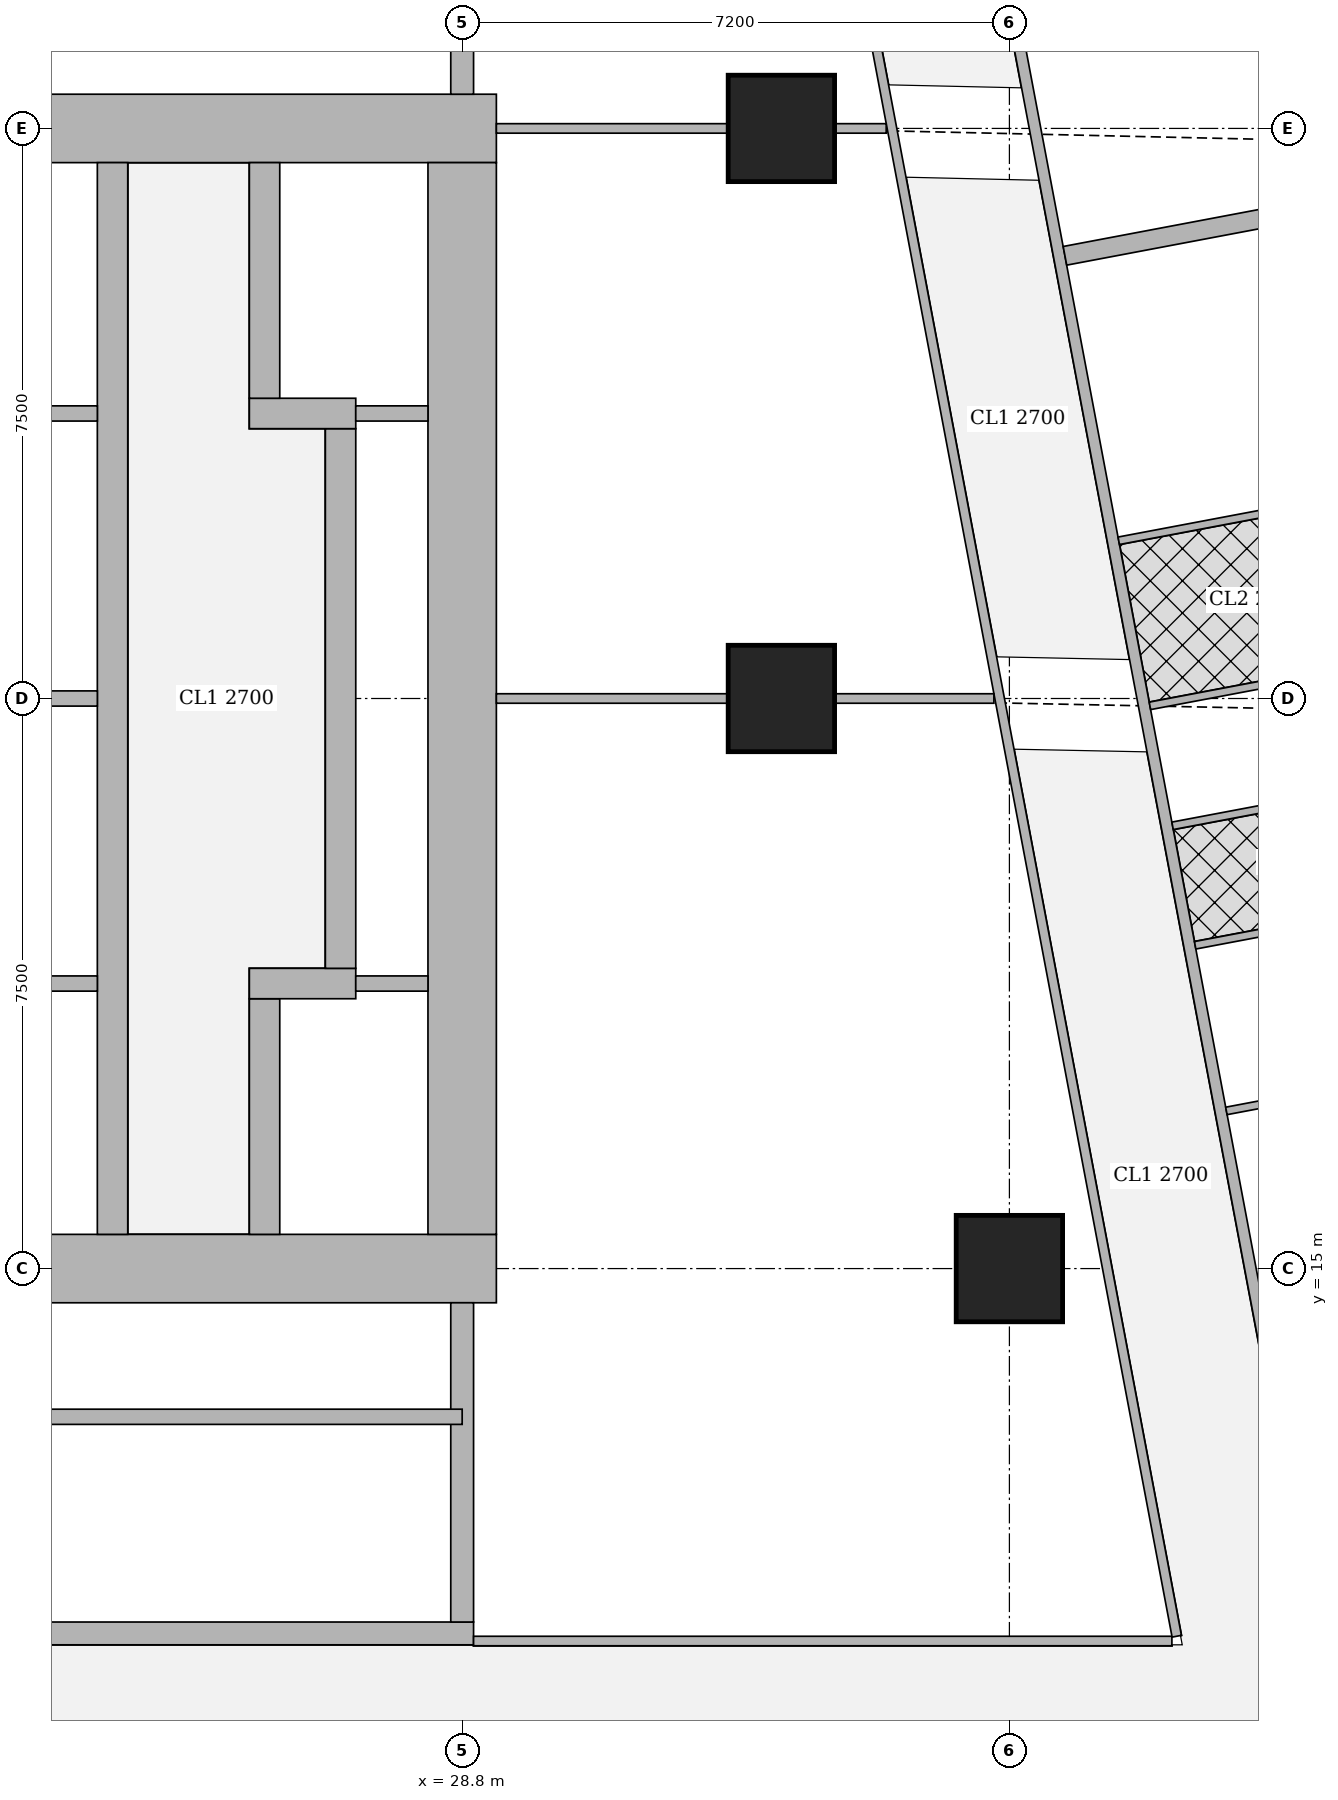
"""IFC4 building model, lengths in metres.
Left out: names, types, materials, properties, quantities, classifications, styles, units other than length and angle.
Written with IfcOpenShell. Run it as: python <this file> out.ifc"""

import sys

from ifc_helpers import new_model, si_unit, direction, frame, frame_2d, origin, origin_2d, place, context, subcontext, project, spatial, rectangle, extrude, element, fill, save


model = new_model("IFC4")
c1 = context("Model", 3, precision=1e-05, world=origin(), true_north=direction((0.0, 1.0)))
c2 = subcontext(c1, "Body", "Model", "MODEL_VIEW")
j1 = project(units=[si_unit("LENGTHUNIT", "METRE"), si_unit("PLANEANGLEUNIT", "RADIAN")], contexts=[c1])
p1 = place(None, origin())
s1 = spatial("IfcSite", under=j1, at=p1, CompositionType="ELEMENT")
p2 = place(p1, origin())
s2 = spatial("IfcBuilding", under=s1, at=p2, CompositionType="ELEMENT")
p3 = place(p2, frame((0.0, 0.0, 234.95)))
s3 = spatial("IfcBuildingStorey", under=s2, at=p3, CompositionType="ELEMENT", Elevation=234.95)
for number, where, z_axis, x_axis in (
    (1, (36.0, 15.0, 0.0), (0.0, 0.0, 1.0), (1.0, 0.0, 0.0)),
    (2, (33.0, 22.5, 0.0), (0.0, 0.0, 1.0), (1.0, 0.0, 0.0)),
    (3, (33.0, 30.0, 0.0), (0.0, 0.0, 1.0), (1.0, 0.0, 0.0)),
):
    element("IfcColumn", number, at=place(p3, frame(where, z_axis=z_axis, x_axis=x_axis)), inside=s3, PredefinedType="COLUMN", context=c2, shape_type="SweptSolid", body=[
        extrude(rectangle(XDim=1.4, YDim=1.4, at=origin_2d()), origin(), (0.0, 0.0, 1.0), 3.75),
    ])
p4 = place(p3, frame((13.95, 15.0, 0.0), z_axis=(0.0, 0.0, 1.0), x_axis=(1.0, 0.0, 0.0)))
e4 = element("IfcWall", 4, at=p4, inside=s3, PredefinedType="SHEAR", context=c2, shape_type="SweptSolid", body=[
    extrude(rectangle(XDim=15.3, YDim=0.9, at=frame_2d((7.65, 0.0))), origin(), (0.0, 0.0, 1.0), 3.75),
])
p5 = place(p4, frame((4.45, 0.0, 0.0)))
e5 = element("IfcOpeningElement", 5, at=p5, cuts=e4, PredefinedType="OPENING", context=c2, shape_type="SweptSolid", body=[
    extrude(rectangle(XDim=1.8, YDim=2.1, at=frame_2d((0.9, 1.05))), frame((0.0, 0.46, 0.0), z_axis=(0.0, -1.0, 0.0), x_axis=(1.0, 0.0, 0.0)), (0.0, 0.0, 1.0), 0.92),
])
p6 = place(p4, frame((10.7, 0.0, 0.0)))
e6 = element("IfcOpeningElement", 6, at=p6, cuts=e4, PredefinedType="OPENING", context=c2, shape_type="SweptSolid", body=[
    extrude(rectangle(XDim=1.1, YDim=2.1, at=frame_2d((0.55, 1.05))), frame((0.0, 0.46, 0.0), z_axis=(0.0, -1.0, 0.0), x_axis=(1.0, 0.0, 0.0)), (0.0, 0.0, 1.0), 0.92),
])
p7 = place(p3, frame((13.95, 30.0, 0.0), z_axis=(0.0, 0.0, 1.0), x_axis=(1.0, 0.0, 0.0)))
e7 = element("IfcWall", 7, at=p7, inside=s3, PredefinedType="SHEAR", context=c2, shape_type="SweptSolid", body=[
    extrude(rectangle(XDim=15.3, YDim=0.9, at=frame_2d((7.65, 0.0))), origin(), (0.0, 0.0, 1.0), 3.75),
])
p8 = place(p7, frame((4.45, 0.0, 0.0)))
e8 = element("IfcOpeningElement", 8, at=p8, cuts=e7, PredefinedType="OPENING", context=c2, shape_type="SweptSolid", body=[
    extrude(rectangle(XDim=1.8, YDim=2.1, at=frame_2d((0.9, 1.05))), frame((0.0, 0.46, 0.0), z_axis=(0.0, -1.0, 0.0), x_axis=(1.0, 0.0, 0.0)), (0.0, 0.0, 1.0), 0.92),
])
p9 = place(p7, frame((10.7, 0.0, 0.0)))
e9 = element("IfcOpeningElement", 9, at=p9, cuts=e7, PredefinedType="OPENING", context=c2, shape_type="SweptSolid", body=[
    extrude(rectangle(XDim=1.1, YDim=2.1, at=frame_2d((0.55, 1.05))), frame((0.0, 0.46, 0.0), z_axis=(0.0, -1.0, 0.0), x_axis=(1.0, 0.0, 0.0)), (0.0, 0.0, 1.0), 0.92),
])
p10 = place(p3, frame((28.8, 15.45, 0.0), z_axis=(0.0, 0.0, 1.0), x_axis=(0.0, 1.0, 0.0)))
e10 = element("IfcWall", 10, at=p10, inside=s3, PredefinedType="SHEAR", context=c2, shape_type="SweptSolid", body=[
    extrude(rectangle(XDim=14.1, YDim=0.9, at=frame_2d((7.05, 0.0))), origin(), (0.0, 0.0, 1.0), 3.75),
])
p11 = place(p3, frame((24.2, 15.45, 0.0), z_axis=(0.0, 0.0, 1.0), x_axis=(0.0, 1.0, 0.0)))
e11 = element("IfcWall", 11, at=p11, inside=s3, PredefinedType="SHEAR", context=c2, shape_type="SweptSolid", body=[
    extrude(rectangle(XDim=14.1, YDim=0.4, at=frame_2d((7.05, 0.0))), origin(), (0.0, 0.0, 1.0), 3.75),
])
p12 = place(p3, frame((26.2, 15.45, 0.0), z_axis=(0.0, 0.0, 1.0), x_axis=(0.0, 1.0, 0.0)))
e12 = element("IfcWall", 12, at=p12, inside=s3, PredefinedType="SHEAR", context=c2, shape_type="SweptSolid", body=[
    extrude(rectangle(XDim=3.1, YDim=0.4, at=frame_2d((1.55, 0.0))), origin(), (0.0, 0.0, 1.0), 3.75),
])
p13 = place(p12, frame((0.825, 0.0, 0.0)))
e13 = element("IfcOpeningElement", 13, at=p13, cuts=e12, PredefinedType="OPENING", context=c2, shape_type="SweptSolid", body=[
    extrude(rectangle(XDim=1.2, YDim=2.1, at=frame_2d((0.6, 1.05))), frame((0.0, 0.21, 0.0), z_axis=(0.0, -1.0, 0.0), x_axis=(1.0, 0.0, 0.0)), (0.0, 0.0, 1.0), 0.42),
])
p14 = place(p3, frame((26.0, 18.75, 0.0), z_axis=(0.0, 0.0, 1.0), x_axis=(1.0, 0.0, 0.0)))
e14 = element("IfcWall", 14, at=p14, inside=s3, PredefinedType="SHEAR", context=c2, shape_type="SweptSolid", body=[
    extrude(rectangle(XDim=1.4, YDim=0.4, at=frame_2d((0.7, 0.0))), origin(), (0.0, 0.0, 1.0), 3.75),
])
p15 = place(p3, frame((27.2, 18.95, 0.0), z_axis=(0.0, 0.0, 1.0), x_axis=(0.0, 1.0, 0.0)))
e15 = element("IfcWall", 15, at=p15, inside=s3, PredefinedType="SHEAR", context=c2, shape_type="SweptSolid", body=[
    extrude(rectangle(XDim=7.1, YDim=0.4, at=frame_2d((3.55, 0.0))), origin(), (0.0, 0.0, 1.0), 3.75),
])
p16 = place(p3, frame((26.0, 26.25, 0.0), z_axis=(0.0, 0.0, 1.0), x_axis=(1.0, 0.0, 0.0)))
e16 = element("IfcWall", 16, at=p16, inside=s3, PredefinedType="SHEAR", context=c2, shape_type="SweptSolid", body=[
    extrude(rectangle(XDim=1.4, YDim=0.4, at=frame_2d((0.7, 0.0))), origin(), (0.0, 0.0, 1.0), 3.75),
])
p17 = place(p3, frame((26.2, 26.45, 0.0), z_axis=(0.0, 0.0, 1.0), x_axis=(0.0, 1.0, 0.0)))
e17 = element("IfcWall", 17, at=p17, inside=s3, PredefinedType="SHEAR", context=c2, shape_type="SweptSolid", body=[
    extrude(rectangle(XDim=3.1, YDim=0.4, at=frame_2d((1.55, 0.0))), origin(), (0.0, 0.0, 1.0), 3.75),
])
p18 = place(p17, frame((1.075, 0.0, 0.0)))
e18 = element("IfcOpeningElement", 18, at=p18, cuts=e17, PredefinedType="OPENING", context=c2, shape_type="SweptSolid", body=[
    extrude(rectangle(XDim=1.2, YDim=2.1, at=frame_2d((0.6, 1.05))), frame((0.0, 0.21, 0.0), z_axis=(0.0, -1.0, 0.0), x_axis=(1.0, 0.0, 0.0)), (0.0, 0.0, 1.0), 0.42),
])
p19 = place(p3, frame((21.45, 10.2, 0.0), z_axis=(0.0, 0.0, 1.0), x_axis=(1.0, 0.0, 0.0)))
e19 = element("IfcWall", 19, at=p19, inside=s3, PredefinedType="SHEAR", context=c2, shape_type="SweptSolid", body=[
    extrude(rectangle(XDim=7.5, YDim=0.3, at=frame_2d((3.75, 0.0))), origin(), (0.0, 0.0, 1.0), 3.75),
])
p20 = place(p19, frame((0.5, 0.0, 0.0)))
e20 = element("IfcOpeningElement", 20, at=p20, cuts=e19, PredefinedType="OPENING", context=c2, shape_type="SweptSolid", body=[
    extrude(rectangle(XDim=1.1, YDim=2.1, at=frame_2d((0.55, 1.05))), frame((0.0, 0.16, 0.0), z_axis=(0.0, -1.0, 0.0), x_axis=(1.0, 0.0, 0.0)), (0.0, 0.0, 1.0), 0.32),
])
for number, where, z_axis, x_axis in (
    (21, (28.8, 10.35, 0.0), (0.0, 0.0, 1.0), (0.0, 1.0, 0.0)),
    (22, (28.8, 30.45, 0.0), (0.0, 0.0, 1.0), (0.0, 1.0, 0.0)),
):
    element("IfcWall", number, at=place(p3, frame(where, z_axis=z_axis, x_axis=x_axis)), inside=s3, PredefinedType="SHEAR", context=c2, shape_type="SweptSolid", body=[
        extrude(rectangle(XDim=4.2, YDim=0.3, at=frame_2d((2.1, 0.0))), origin(), (0.0, 0.0, 1.0), 3.75),
    ])
p21 = place(p3, frame((33.933, 42.73, 0.0), z_axis=(0.0, 0.0, 1.0), x_axis=(0.185595417643, -0.982626246825, 0.0)))
e23 = element("IfcWall", 23, at=p21, inside=s3, PredefinedType="SOLIDWALL", context=c2, shape_type="SweptSolid", body=[
    extrude(rectangle(XDim=41.051, YDim=0.15, at=frame_2d((20.525, 0.0))), origin(), (0.0, 0.0, 1.0), 2.5),
])
p22 = place(p21, frame((12.266, 0.0, 0.0)))
e24 = element("IfcOpeningElement", 24, at=p22, cuts=e23, PredefinedType="OPENING", context=c2, shape_type="SweptSolid", body=[
    extrude(rectangle(XDim=1.0, YDim=2.1, at=frame_2d((0.5, 1.05))), frame((0.0, 0.085, 0.0), z_axis=(0.0, -1.0, 0.0), x_axis=(1.0, 0.0, 0.0)), (0.0, 0.0, 1.0), 0.17),
])
p23 = place(p21, frame((16.082, 0.0, 0.0)))
e25 = element("IfcOpeningElement", 25, at=p23, cuts=e23, PredefinedType="OPENING", context=c2, shape_type="SweptSolid", body=[
    extrude(rectangle(XDim=1.0, YDim=2.1, at=frame_2d((0.5, 1.05))), frame((0.0, 0.085, 0.0), z_axis=(0.0, -1.0, 0.0), x_axis=(1.0, 0.0, 0.0)), (0.0, 0.0, 1.0), 0.17),
])
p24 = place(p21, frame((30.862, 0.0, 0.0)))
e26 = element("IfcOpeningElement", 26, at=p24, cuts=e23, PredefinedType="OPENING", context=c2, shape_type="SweptSolid", body=[
    extrude(rectangle(XDim=1.0, YDim=2.1, at=frame_2d((0.5, 1.05))), frame((0.0, 0.085, 0.0), z_axis=(0.0, -1.0, 0.0), x_axis=(1.0, 0.0, 0.0)), (0.0, 0.0, 1.0), 0.17),
])
for number, where, z_axis, x_axis in (
    (27, (40.657, 25.183, 0.0), (0.0, 0.0, 1.0), (-0.983, -0.186, 0.0)),
    (28, (41.365, 21.433, 0.0), (0.0, 0.0, 1.0), (-0.983, -0.186, 0.0)),
):
    element("IfcWall", number, at=place(p3, frame(where, z_axis=z_axis, x_axis=x_axis)), inside=s3, PredefinedType="PARTITIONING", context=c2, shape_type="SweptSolid", body=[
        extrude(rectangle(XDim=3.275, YDim=0.1, at=frame_2d((1.637, 0.0))), origin(), (0.0, 0.0, 1.0), 3.5),
    ])
p25 = place(p3, frame((42.073, 17.682, 0.0), z_axis=(0.0, 0.0, 1.0), x_axis=(-0.982620626894, -0.185625169636, 0.0)))
e29 = element("IfcWall", 29, at=p25, inside=s3, PredefinedType="PARTITIONING", context=c2, shape_type="SweptSolid", body=[
    extrude(rectangle(XDim=3.275, YDim=0.1, at=frame_2d((1.637, 0.0))), origin(), (0.0, 0.0, 1.0), 3.5),
])
p26 = place(p25, frame((1.2, 0.0, 0.0)))
e30 = element("IfcOpeningElement", 30, at=p26, cuts=e29, PredefinedType="OPENING", context=c2, shape_type="SweptSolid", body=[
    extrude(rectangle(XDim=0.9, YDim=2.1, at=frame_2d((0.45, 1.05))), frame((0.0, 0.06, 0.0), z_axis=(0.0, -1.0, 0.0), x_axis=(1.0, 0.0, 0.0)), (0.0, 0.0, 1.0), 0.12),
])
p27 = place(p3, frame((41.067, 23.011, 0.0), z_axis=(0.0, 0.0, 1.0), x_axis=(-0.982618057925, -0.185638768151, 0.0)))
e31 = element("IfcWall", 31, at=p27, inside=s3, PredefinedType="PARTITIONING", context=c2, shape_type="SweptSolid", body=[
    extrude(rectangle(XDim=3.275, YDim=0.1, at=frame_2d((1.637, 0.0))), origin(), (0.0, 0.0, 1.0), 2.5),
])
p28 = place(p3, frame((41.662, 19.861, 0.0), z_axis=(0.0, 0.0, 1.0), x_axis=(-0.982607026909, -0.185697147715, 0.0)))
e32 = element("IfcWall", 32, at=p28, inside=s3, PredefinedType="PARTITIONING", context=c2, shape_type="SweptSolid", body=[
    extrude(rectangle(XDim=3.275, YDim=0.1, at=frame_2d((1.637, 0.0))), origin(), (0.0, 0.0, 1.0), 3.5),
])
p29 = place(p3, frame((41.177, 29.164, 0.0), z_axis=(0.0, 0.0, 1.0), x_axis=(-0.982612837616, -0.185666398014, 0.0)))
e33 = element("IfcWall", 33, at=p29, inside=s3, PredefinedType="SOLIDWALL", context=c2, shape_type="SweptSolid", body=[
    extrude(rectangle(XDim=4.525, YDim=0.25, at=frame_2d((2.262, 0.0))), origin(), (0.0, 0.0, 1.0), 2.5),
])
p30 = place(p3, frame((28.95, 10.1, 0.0), z_axis=(0.0, 0.0, 1.0), x_axis=(1.0, 0.0, 0.0)))
e34 = element("IfcWall", 34, at=p30, inside=s3, PredefinedType="PARTITIONING", context=c2, shape_type="SweptSolid", body=[
    extrude(rectangle(XDim=9.188, YDim=0.125, at=frame_2d((4.594, 0.0))), origin(), (0.0, 0.0, 1.0), 3.5),
])
p31 = place(p3, frame((38.202, 10.163, 0.0), z_axis=(0.0, 0.0, 1.0), x_axis=(-0.185610321132, 0.982623431783, 0.0)))
e35 = element("IfcWall", 35, at=p31, inside=s3, PredefinedType="PARTITIONING", context=c2, shape_type="SweptSolid", body=[
    extrude(rectangle(XDim=25.111, YDim=0.125, at=frame_2d((12.556, 0.0))), origin(), (0.0, 0.0, 1.0), 2.5),
])
p32 = place(p31, frame((0.708, 0.0, 0.0)))
e36 = element("IfcOpeningElement", 36, at=p32, cuts=e35, PredefinedType="OPENING", context=c2, shape_type="SweptSolid", body=[
    extrude(rectangle(XDim=1.0, YDim=2.1, at=frame_2d((0.5, 1.05))), frame((0.0, 0.073, 0.0), z_axis=(0.0, -1.0, 0.0), x_axis=(1.0, 0.0, 0.0)), (0.0, 0.0, 1.0), 0.145),
])
p33 = place(p31, frame((13.378, 0.0, 0.0)))
e37 = element("IfcOpeningElement", 37, at=p33, cuts=e35, PredefinedType="OPENING", context=c2, shape_type="SweptSolid", body=[
    extrude(rectangle(XDim=1.0, YDim=2.1, at=frame_2d((0.5, 1.05))), frame((0.0, 0.073, 0.0), z_axis=(0.0, -1.0, 0.0), x_axis=(1.0, 0.0, 0.0)), (0.0, 0.0, 1.0), 0.145),
])
p34 = place(p31, frame((21.15, 0.0, 0.0)))
e38 = element("IfcOpeningElement", 38, at=p34, cuts=e35, PredefinedType="OPENING", context=c2, shape_type="SweptSolid", body=[
    extrude(rectangle(XDim=1.0, YDim=2.1, at=frame_2d((0.5, 1.05))), frame((0.0, 0.073, 0.0), z_axis=(0.0, -1.0, 0.0), x_axis=(1.0, 0.0, 0.0)), (0.0, 0.0, 1.0), 0.145),
])
p35 = place(p31, frame((23.453, 0.0, 0.0)))
e39 = element("IfcOpeningElement", 39, at=p35, cuts=e35, PredefinedType="OPENING", context=c2, shape_type="SweptSolid", body=[
    extrude(rectangle(XDim=1.0, YDim=2.1, at=frame_2d((0.5, 1.05))), frame((0.0, 0.073, 0.0), z_axis=(0.0, -1.0, 0.0), x_axis=(1.0, 0.0, 0.0)), (0.0, 0.0, 1.0), 0.145),
])
p36 = place(p3, frame((29.25, 22.5, 0.0), z_axis=(0.0, 0.0, 1.0), x_axis=(1.0, 0.0, 0.0)))
e40 = element("IfcWall", 40, at=p36, inside=s3, PredefinedType="PARTITIONING", context=c2, shape_type="SweptSolid", body=[
    extrude(rectangle(XDim=3.049, YDim=0.125, at=frame_2d((1.524, 0.0))), origin(), (0.0, 0.0, 1.0), 3.5),
])
p37 = place(p3, frame((33.701, 22.5, 0.0), z_axis=(0.0, 0.0, 1.0), x_axis=(1.0, 0.0, 0.0)))
e41 = element("IfcWall", 41, at=p37, inside=s3, PredefinedType="PARTITIONING", context=c2, shape_type="SweptSolid", body=[
    extrude(rectangle(XDim=2.095, YDim=0.125, at=frame_2d((1.047, 0.0))), origin(), (0.0, 0.0, 1.0), 2.5),
])
p38 = place(p3, frame((29.25, 30.0, 0.0), z_axis=(0.0, 0.0, 1.0), x_axis=(1.0, 0.0, 0.0)))
e42 = element("IfcWall", 42, at=p38, inside=s3, PredefinedType="PARTITIONING", context=c2, shape_type="SweptSolid", body=[
    extrude(rectangle(XDim=3.049, YDim=0.125, at=frame_2d((1.524, 0.0))), origin(), (0.0, 0.0, 1.0), 3.5),
])
p39 = place(p3, frame((33.701, 30.0, 0.0), z_axis=(0.0, 0.0, 1.0), x_axis=(1.0, 0.0, 0.0)))
e43 = element("IfcWall", 43, at=p39, inside=s3, PredefinedType="PARTITIONING", context=c2, shape_type="SweptSolid", body=[
    extrude(rectangle(XDim=0.678, YDim=0.125, at=frame_2d((0.339, 0.0))), origin(), (0.0, 0.0, 1.0), 2.5),
])
p40 = place(p3, frame((23.0, 13.05, 0.0), z_axis=(0.0, 0.0, 1.0), x_axis=(1.0, 0.0, 0.0)))
e44 = element("IfcWall", 44, at=p40, inside=s3, PredefinedType="SHEAR", context=c2, shape_type="SweptSolid", body=[
    extrude(rectangle(XDim=5.8, YDim=0.2, at=frame_2d((2.9, 0.0))), origin(), (0.0, 0.0, 1.0), 3.75),
])
for number, where, z_axis, x_axis in (
    (45, (21.8, 18.75, 0.0), (0.0, 0.0, 1.0), (1.0, 0.0, 0.0)),
    (46, (21.8, 22.5, 0.0), (0.0, 0.0, 1.0), (1.0, 0.0, 0.0)),
    (47, (21.8, 26.25, 0.0), (0.0, 0.0, 1.0), (1.0, 0.0, 0.0)),
):
    element("IfcWall", number, at=place(p3, frame(where, z_axis=z_axis, x_axis=x_axis)), inside=s3, PredefinedType="SOLIDWALL", context=c2, shape_type="SweptSolid", body=[
        extrude(rectangle(XDim=2.2, YDim=0.2, at=frame_2d((1.1, 0.0))), origin(), (0.0, 0.0, 1.0), 3.5),
    ])
for number, where, z_axis, x_axis in (
    (48, (27.4, 18.75, 0.0), (0.0, 0.0, 1.0), (1.0, 0.0, 0.0)),
    (49, (27.4, 26.25, 0.0), (0.0, 0.0, 1.0), (1.0, 0.0, 0.0)),
):
    element("IfcWall", number, at=place(p3, frame(where, z_axis=z_axis, x_axis=x_axis)), inside=s3, PredefinedType="SOLIDWALL", context=c2, shape_type="SweptSolid", body=[
        extrude(rectangle(XDim=0.95, YDim=0.2, at=frame_2d((0.475, 0.0))), origin(), (0.0, 0.0, 1.0), 3.5),
    ])
p41 = place(p22, origin())
e50 = element("IfcDoor", 50, at=p41, inside=s3, OperationType="SINGLE_SWING_RIGHT", PredefinedType="DOOR", context=c2, shape_type="SweptSolid", body=[
    extrude(rectangle(XDim=1.0, YDim=2.1, at=frame_2d((0.5, 1.05))), frame((0.0, 0.025, 0.0), z_axis=(0.0, -1.0, 0.0), x_axis=(1.0, 0.0, 0.0)), (0.0, 0.0, 1.0), 0.05),
])
fill(e24, e50)
p42 = place(p23, origin())
e51 = element("IfcDoor", 51, at=p42, inside=s3, OperationType="SINGLE_SWING_LEFT", PredefinedType="DOOR", context=c2, shape_type="SweptSolid", body=[
    extrude(rectangle(XDim=1.0, YDim=2.1, at=frame_2d((0.5, 1.05))), frame((0.0, 0.025, 0.0), z_axis=(0.0, -1.0, 0.0), x_axis=(1.0, 0.0, 0.0)), (0.0, 0.0, 1.0), 0.05),
])
fill(e25, e51)
p43 = place(p32, origin())
e52 = element("IfcDoor", 52, at=p43, inside=s3, OperationType="SINGLE_SWING_LEFT", PredefinedType="DOOR", context=c2, shape_type="SweptSolid", body=[
    extrude(rectangle(XDim=1.0, YDim=2.1, at=frame_2d((0.5, 1.05))), frame((0.0, 0.025, 0.0), z_axis=(0.0, -1.0, 0.0), x_axis=(1.0, 0.0, 0.0)), (0.0, 0.0, 1.0), 0.05),
])
fill(e36, e52)
p44 = place(p33, origin())
e53 = element("IfcDoor", 53, at=p44, inside=s3, OperationType="SINGLE_SWING_LEFT", PredefinedType="DOOR", context=c2, shape_type="SweptSolid", body=[
    extrude(rectangle(XDim=1.0, YDim=2.1, at=frame_2d((0.5, 1.05))), frame((0.0, 0.025, 0.0), z_axis=(0.0, -1.0, 0.0), x_axis=(1.0, 0.0, 0.0)), (0.0, 0.0, 1.0), 0.05),
])
fill(e37, e53)
p45 = place(p34, origin())
e54 = element("IfcDoor", 54, at=p45, inside=s3, OperationType="SINGLE_SWING_RIGHT", PredefinedType="DOOR", context=c2, shape_type="SweptSolid", body=[
    extrude(rectangle(XDim=1.0, YDim=2.1, at=frame_2d((0.5, 1.05))), frame((0.0, 0.025, 0.0), z_axis=(0.0, -1.0, 0.0), x_axis=(1.0, 0.0, 0.0)), (0.0, 0.0, 1.0), 0.05),
])
fill(e38, e54)
p46 = place(p6, origin())
e55 = element("IfcDoor", 55, at=p46, inside=s3, OperationType="SINGLE_SWING_LEFT", PredefinedType="DOOR", context=c2, shape_type="SweptSolid", body=[
    extrude(rectangle(XDim=1.1, YDim=2.1, at=frame_2d((0.55, 1.05))), frame((0.0, 0.025, 0.0), z_axis=(0.0, -1.0, 0.0), x_axis=(1.0, 0.0, 0.0)), (0.0, 0.0, 1.0), 0.05),
])
fill(e6, e55)
p47 = place(p9, origin())
e56 = element("IfcDoor", 56, at=p47, inside=s3, OperationType="SINGLE_SWING_LEFT", PredefinedType="DOOR", context=c2, shape_type="SweptSolid", body=[
    extrude(rectangle(XDim=1.1, YDim=2.1, at=frame_2d((0.55, 1.05))), frame((0.0, 0.025, 0.0), z_axis=(0.0, -1.0, 0.0), x_axis=(1.0, 0.0, 0.0)), (0.0, 0.0, 1.0), 0.05),
])
fill(e9, e56)
p48 = place(p13, origin())
e57 = element("IfcDoor", 57, at=p48, inside=s3, OperationType="DOUBLE_DOOR_SLIDING", PredefinedType="DOOR", context=c2, shape_type="SweptSolid", body=[
    extrude(rectangle(XDim=1.2, YDim=2.1, at=frame_2d((0.6, 1.05))), frame((0.0, 0.025, 0.0), z_axis=(0.0, -1.0, 0.0), x_axis=(1.0, 0.0, 0.0)), (0.0, 0.0, 1.0), 0.05),
])
fill(e13, e57)
p49 = place(p18, origin())
e58 = element("IfcDoor", 58, at=p49, inside=s3, OperationType="DOUBLE_DOOR_SLIDING", PredefinedType="DOOR", context=c2, shape_type="SweptSolid", body=[
    extrude(rectangle(XDim=1.2, YDim=2.1, at=frame_2d((0.6, 1.05))), frame((0.0, 0.025, 0.0), z_axis=(0.0, -1.0, 0.0), x_axis=(1.0, 0.0, 0.0)), (0.0, 0.0, 1.0), 0.05),
])
fill(e18, e58)
save(model, sys.argv[1])
